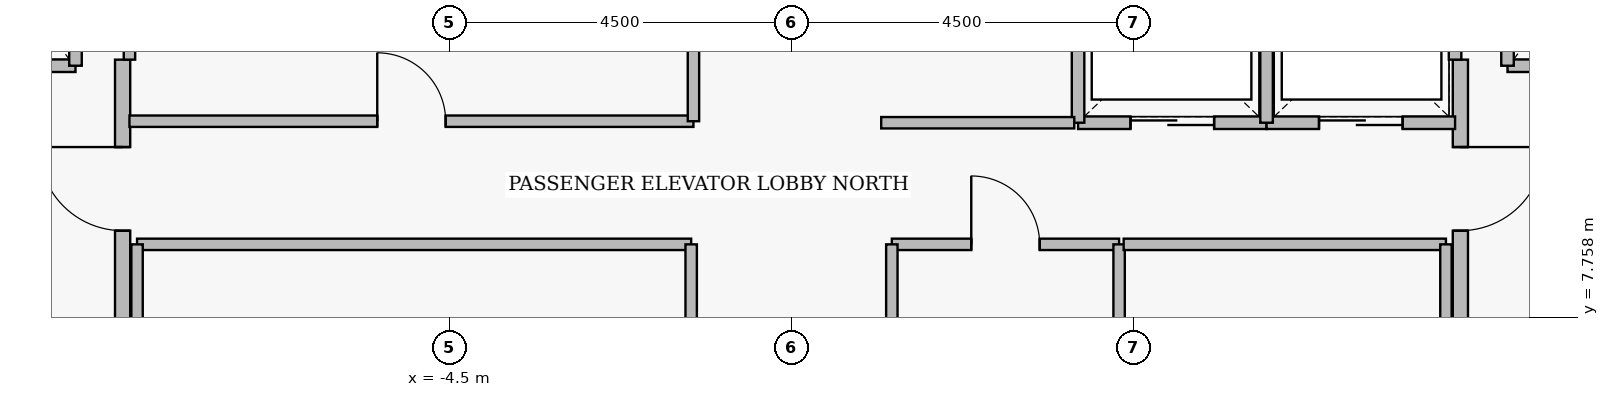
"""IFC4 building model, lengths in metres.
Left out: names, types, materials, properties, quantities, classifications, styles, units other than length and angle.
Written with IfcOpenShell. Run it as: python <this file> out.ifc"""

import sys

from ifc_helpers import new_model, si_unit, direction, frame, frame_2d, origin, place, context, subcontext, project, spatial, rectangle, extrude, element, fill, save


model = new_model("IFC4")
c1 = context("Model", 3, precision=1e-05, world=origin(), true_north=direction((0.0, 1.0)))
c2 = subcontext(c1, "Body", "Model", "MODEL_VIEW")
j1 = project(units=[si_unit("LENGTHUNIT", "METRE"), si_unit("PLANEANGLEUNIT", "RADIAN")], contexts=[c1])
p1 = place(None, origin())
s1 = spatial("IfcSite", under=j1, at=p1, CompositionType="ELEMENT")
p2 = place(p1, origin())
s2 = spatial("IfcBuilding", under=s1, at=p2, CompositionType="ELEMENT")
p3 = place(p2, frame((0.0, 0.0, 292.85)))
s3 = spatial("IfcBuildingStorey", under=s2, at=p3, CompositionType="ELEMENT", Elevation=292.85)
p4 = place(p3, frame((-8.8, 5.05, 0.0), z_axis=(0.0, 0.0, 1.0), x_axis=(0.0, 1.0, 0.0)))
e1 = element("IfcWall", 1, at=p4, inside=s3, PredefinedType="PARTITIONING", context=c2, shape_type="SweptSolid", body=[
    extrude(rectangle(XDim=6.1, YDim=0.2, at=frame_2d((3.05, 0.0))), origin(), (0.0, 0.0, 1.0), 4.16),
])
p5 = place(p4, frame((0.25, 0.0, 0.0)))
e2 = element("IfcOpeningElement", 2, at=p5, cuts=e1, PredefinedType="OPENING", context=c2, shape_type="SweptSolid", body=[
    extrude(rectangle(XDim=1.1, YDim=2.2, at=frame_2d((0.55, 1.1))), frame((0.0, 0.11, 0.0), z_axis=(0.0, -1.0, 0.0), x_axis=(1.0, 0.0, 0.0)), (0.0, 0.0, 1.0), 0.22),
])
p6 = place(p4, frame((3.85, 0.0, 0.0)))
e3 = element("IfcOpeningElement", 3, at=p6, cuts=e1, PredefinedType="OPENING", context=c2, shape_type="SweptSolid", body=[
    extrude(rectangle(XDim=1.1, YDim=2.2, at=frame_2d((0.55, 1.1))), frame((0.0, 0.11, 0.0), z_axis=(0.0, -1.0, 0.0), x_axis=(1.0, 0.0, 0.0)), (0.0, 0.0, 1.0), 0.22),
])
p7 = place(p3, frame((8.8, 11.15, 0.0), z_axis=(0.0, 0.0, 1.0), x_axis=(0.0, -1.0, 0.0)))
e4 = element("IfcWall", 4, at=p7, inside=s3, PredefinedType="PARTITIONING", context=c2, shape_type="SweptSolid", body=[
    extrude(rectangle(XDim=6.1, YDim=0.2, at=frame_2d((3.05, 0.0))), origin(), (0.0, 0.0, 1.0), 4.16),
])
p8 = place(p7, frame((1.15, 0.0, 0.0)))
e5 = element("IfcOpeningElement", 5, at=p8, cuts=e4, PredefinedType="OPENING", context=c2, shape_type="SweptSolid", body=[
    extrude(rectangle(XDim=1.1, YDim=2.2, at=frame_2d((0.55, 1.1))), frame((0.0, 0.11, 0.0), z_axis=(0.0, -1.0, 0.0), x_axis=(1.0, 0.0, 0.0)), (0.0, 0.0, 1.0), 0.22),
])
p9 = place(p7, frame((4.75, 0.0, 0.0)))
e6 = element("IfcOpeningElement", 6, at=p9, cuts=e4, PredefinedType="OPENING", context=c2, shape_type="SweptSolid", body=[
    extrude(rectangle(XDim=1.1, YDim=2.2, at=frame_2d((0.55, 1.1))), frame((0.0, 0.11, 0.0), z_axis=(0.0, -1.0, 0.0), x_axis=(1.0, 0.0, 0.0)), (0.0, 0.0, 1.0), 0.22),
])
p10 = place(p3, frame((-11.58, 11.07, 0.0), z_axis=(0.0, 0.0, 1.0), x_axis=(1.0, 0.0, 0.0)))
e7 = element("IfcWall", 7, at=p10, inside=s3, PredefinedType="PARTITIONING", context=c2, shape_type="SweptSolid", body=[
    extrude(rectangle(XDim=2.16, YDim=0.165, at=frame_2d((1.08, 0.0))), origin(), (0.0, 0.0, 1.0), 4.16),
])
p11 = place(p10, frame((0.53, 0.0, 0.0)))
e8 = element("IfcOpeningElement", 8, at=p11, cuts=e7, PredefinedType="OPENING", context=c2, shape_type="SweptSolid", body=[
    extrude(rectangle(XDim=1.15, YDim=2.25, at=frame_2d((0.575, 1.125))), frame((0.0, 0.093, 0.0), z_axis=(0.0, -1.0, 0.0), x_axis=(1.0, 0.0, 0.0)), (0.0, 0.0, 1.0), 0.185),
])
p12 = place(p3, frame((9.42, 11.07, 0.0), z_axis=(0.0, 0.0, 1.0), x_axis=(1.0, 0.0, 0.0)))
e9 = element("IfcWall", 9, at=p12, inside=s3, PredefinedType="PARTITIONING", context=c2, shape_type="SweptSolid", body=[
    extrude(rectangle(XDim=2.16, YDim=0.165, at=frame_2d((1.08, 0.0))), origin(), (0.0, 0.0, 1.0), 4.16),
])
p13 = place(p12, frame((0.53, 0.0, 0.0)))
e10 = element("IfcOpeningElement", 10, at=p13, cuts=e9, PredefinedType="OPENING", context=c2, shape_type="SweptSolid", body=[
    extrude(rectangle(XDim=1.15, YDim=2.25, at=frame_2d((0.575, 1.125))), frame((0.0, 0.093, 0.0), z_axis=(0.0, -1.0, 0.0), x_axis=(1.0, 0.0, 0.0)), (0.0, 0.0, 1.0), 0.185),
])
p14 = place(p3, frame((3.77, 10.32, 0.0), z_axis=(0.0, 0.0, 1.0), x_axis=(1.0, 0.0, 0.0)))
e11 = element("IfcWall", 11, at=p14, inside=s3, PredefinedType="PARTITIONING", context=c2, shape_type="SweptSolid", body=[
    extrude(rectangle(XDim=2.48, YDim=0.165, at=frame_2d((1.24, 0.0))), origin(), (0.0, 0.0, 1.0), 4.16),
])
p15 = place(p14, frame((0.69, 0.0, 0.0)))
e12 = element("IfcOpeningElement", 12, at=p15, cuts=e11, PredefinedType="OPENING", context=c2, shape_type="SweptSolid", body=[
    extrude(rectangle(XDim=1.1, YDim=2.25, at=frame_2d((0.55, 1.125))), frame((0.0, 0.093, 0.0), z_axis=(0.0, -1.0, 0.0), x_axis=(1.0, 0.0, 0.0)), (0.0, 0.0, 1.0), 0.185),
])
p16 = place(p3, frame((6.25, 10.32, 0.0), z_axis=(0.0, 0.0, 1.0), x_axis=(1.0, 0.0, 0.0)))
e13 = element("IfcWall", 13, at=p16, inside=s3, PredefinedType="PARTITIONING", context=c2, shape_type="SweptSolid", body=[
    extrude(rectangle(XDim=2.48, YDim=0.165, at=frame_2d((1.24, 0.0))), origin(), (0.0, 0.0, 1.0), 4.16),
])
p17 = place(p16, frame((0.69, 0.0, 0.0)))
e14 = element("IfcOpeningElement", 14, at=p17, cuts=e13, PredefinedType="OPENING", context=c2, shape_type="SweptSolid", body=[
    extrude(rectangle(XDim=1.1, YDim=2.25, at=frame_2d((0.55, 1.125))), frame((0.0, 0.093, 0.0), z_axis=(0.0, -1.0, 0.0), x_axis=(1.0, 0.0, 0.0)), (0.0, 0.0, 1.0), 0.185),
])
p18 = place(p3, frame((-8.71, 10.34, 0.0), z_axis=(0.0, 0.0, 1.0), x_axis=(1.0, 0.0, 0.0)))
e15 = element("IfcWall", 15, at=p18, inside=s3, PredefinedType="PARTITIONING", context=c2, shape_type="SweptSolid", body=[
    extrude(rectangle(XDim=7.42, YDim=0.15, at=frame_2d((3.71, 0.0))), origin(), (0.0, 0.0, 1.0), 4.16),
])
p19 = place(p18, frame((3.26, 0.0, 0.0)))
e16 = element("IfcOpeningElement", 16, at=p19, cuts=e15, PredefinedType="OPENING", context=c2, shape_type="SweptSolid", body=[
    extrude(rectangle(XDim=0.9, YDim=2.15, at=frame_2d((0.45, 1.075))), frame((0.0, 0.085, 0.0), z_axis=(0.0, -1.0, 0.0), x_axis=(1.0, 0.0, 0.0)), (0.0, 0.0, 1.0), 0.17),
])
p20 = place(p3, frame((1.32, 8.72, 0.0), z_axis=(0.0, 0.0, 1.0), x_axis=(1.0, 0.0, 0.0)))
e17 = element("IfcWall", 17, at=p20, inside=s3, PredefinedType="PARTITIONING", context=c2, shape_type="SweptSolid", body=[
    extrude(rectangle(XDim=2.99, YDim=0.15, at=frame_2d((1.495, 0.0))), origin(), (0.0, 0.0, 1.0), 4.16),
])
p21 = place(p20, frame((1.045, 0.0, 0.0)))
e18 = element("IfcOpeningElement", 18, at=p21, cuts=e17, PredefinedType="OPENING", context=c2, shape_type="SweptSolid", body=[
    extrude(rectangle(XDim=0.9, YDim=2.15, at=frame_2d((0.45, 1.075))), frame((0.0, 0.085, 0.0), z_axis=(0.0, -1.0, 0.0), x_axis=(1.0, 0.0, 0.0)), (0.0, 0.0, 1.0), 0.17),
])
for number, where, z_axis, x_axis in (
    (19, (-9.42, 11.07, 0.0), (0.0, 0.0, 1.0), (0.0, 1.0, 0.0)),
    (20, (9.42, 11.07, 0.0), (0.0, 0.0, 1.0), (0.0, 1.0, 0.0)),
):
    element("IfcWall", number, at=place(p3, frame(where, z_axis=z_axis, x_axis=x_axis)), inside=s3, PredefinedType="PARTITIONING", context=c2, shape_type="SweptSolid", body=[
        extrude(rectangle(XDim=2.96, YDim=0.165, at=frame_2d((1.48, 0.0))), origin(), (0.0, 0.0, 1.0), 4.16),
    ])
for number, where, z_axis, x_axis in (
    (21, (3.77, 10.32, 0.0), (0.0, 0.0, 1.0), (0.0, 1.0, 0.0)),
    (22, (6.25, 10.32, 0.0), (0.0, 0.0, 1.0), (0.0, 1.0, 0.0)),
):
    element("IfcWall", number, at=place(p3, frame(where, z_axis=z_axis, x_axis=x_axis)), inside=s3, PredefinedType="PARTITIONING", context=c2, shape_type="SweptSolid", body=[
        extrude(rectangle(XDim=2.36, YDim=0.165, at=frame_2d((1.18, 0.0))), origin(), (0.0, 0.0, 1.0), 4.16),
    ])
p22 = place(p3, frame((8.73, 11.15, 0.0), z_axis=(0.0, 0.0, 1.0), x_axis=(0.0, 1.0, 0.0)))
e23 = element("IfcWall", 23, at=p22, inside=s3, PredefinedType="PARTITIONING", context=c2, shape_type="SweptSolid", body=[
    extrude(rectangle(XDim=1.53, YDim=0.165, at=frame_2d((0.765, 0.0))), origin(), (0.0, 0.0, 1.0), 4.16),
])
p23 = place(p3, frame((-8.71, 11.15, 0.0), z_axis=(0.0, 0.0, 1.0), x_axis=(0.0, 1.0, 0.0)))
e24 = element("IfcWall", 24, at=p23, inside=s3, PredefinedType="PARTITIONING", context=c2, shape_type="SweptSolid", body=[
    extrude(rectangle(XDim=1.71, YDim=0.15, at=frame_2d((0.855, 0.0))), origin(), (0.0, 0.0, 1.0), 4.16),
])
p24 = place(p3, frame((-1.29, 10.34, 0.0), z_axis=(0.0, 0.0, 1.0), x_axis=(0.0, 1.0, 0.0)))
e25 = element("IfcWall", 25, at=p24, inside=s3, PredefinedType="PARTITIONING", context=c2, shape_type="SweptSolid", body=[
    extrude(rectangle(XDim=2.52, YDim=0.15, at=frame_2d((1.26, 0.0))), origin(), (0.0, 0.0, 1.0), 4.16),
])
p25 = place(p3, frame((-8.61, 8.72, 0.0), z_axis=(0.0, 0.0, 1.0), x_axis=(1.0, 0.0, 0.0)))
e26 = element("IfcWall", 26, at=p25, inside=s3, PredefinedType="PARTITIONING", context=c2, shape_type="SweptSolid", body=[
    extrude(rectangle(XDim=7.29, YDim=0.15, at=frame_2d((3.645, 0.0))), origin(), (0.0, 0.0, 1.0), 4.16),
])
for number, where, z_axis, x_axis in (
    (27, (-8.61, 6.48, 0.0), (0.0, 0.0, 1.0), (0.0, 1.0, 0.0)),
    (28, (-1.32, 6.48, 0.0), (0.0, 0.0, 1.0), (0.0, 1.0, 0.0)),
    (29, (1.32, 6.48, 0.0), (0.0, 0.0, 1.0), (0.0, 1.0, 0.0)),
    (30, (4.31, 6.48, 0.0), (0.0, 0.0, 1.0), (0.0, 1.0, 0.0)),
):
    element("IfcWall", number, at=place(p3, frame(where, z_axis=z_axis, x_axis=x_axis)), inside=s3, PredefinedType="PARTITIONING", context=c2, shape_type="SweptSolid", body=[
        extrude(rectangle(XDim=2.24, YDim=0.15, at=frame_2d((1.12, 0.0))), origin(), (0.0, 0.0, 1.0), 4.16),
    ])
p26 = place(p3, frame((4.37, 8.72, 0.0), z_axis=(0.0, 0.0, 1.0), x_axis=(1.0, 0.0, 0.0)))
e31 = element("IfcWall", 31, at=p26, inside=s3, PredefinedType="PARTITIONING", context=c2, shape_type="SweptSolid", body=[
    extrude(rectangle(XDim=4.24, YDim=0.15, at=frame_2d((2.12, 0.0))), origin(), (0.0, 0.0, 1.0), 4.16),
])
p27 = place(p3, frame((8.61, 6.48, 0.0), z_axis=(0.0, 0.0, 1.0), x_axis=(0.0, 1.0, 0.0)))
e32 = element("IfcWall", 32, at=p27, inside=s3, PredefinedType="PARTITIONING", context=c2, shape_type="SweptSolid", body=[
    extrude(rectangle(XDim=2.24, YDim=0.15, at=frame_2d((1.12, 0.0))), origin(), (0.0, 0.0, 1.0), 4.16),
])
p28 = place(p3, frame((1.18, 10.32, 0.0), z_axis=(0.0, 0.0, 1.0), x_axis=(1.0, 0.0, 0.0)))
e33 = element("IfcWall", 33, at=p28, inside=s3, PredefinedType="PARTITIONING", context=c2, shape_type="SweptSolid", body=[
    extrude(rectangle(XDim=2.54, YDim=0.15, at=frame_2d((1.27, 0.0))), origin(), (0.0, 0.0, 1.0), 4.16),
])
p29 = place(p6, origin())
e34 = element("IfcDoor", 34, at=p29, inside=s3, OperationType="SINGLE_SWING_RIGHT", PredefinedType="DOOR", context=c2, shape_type="SweptSolid", body=[
    extrude(rectangle(XDim=1.1, YDim=2.2, at=frame_2d((0.55, 1.1))), frame((0.0, 0.025, 0.0), z_axis=(0.0, -1.0, 0.0), x_axis=(1.0, 0.0, 0.0)), (0.0, 0.0, 1.0), 0.05),
])
fill(e3, e34)
p30 = place(p8, origin())
e35 = element("IfcDoor", 35, at=p30, inside=s3, OperationType="SINGLE_SWING_LEFT", PredefinedType="DOOR", context=c2, shape_type="SweptSolid", body=[
    extrude(rectangle(XDim=1.1, YDim=2.2, at=frame_2d((0.55, 1.1))), frame((0.0, 0.025, 0.0), z_axis=(0.0, -1.0, 0.0), x_axis=(1.0, 0.0, 0.0)), (0.0, 0.0, 1.0), 0.05),
])
fill(e5, e35)
p31 = place(p15, origin())
e36 = element("IfcDoor", 36, at=p31, inside=s3, OperationType="SLIDING_TO_LEFT", PredefinedType="DOOR", context=c2, shape_type="SweptSolid", body=[
    extrude(rectangle(XDim=1.1, YDim=2.25, at=frame_2d((0.55, 1.125))), frame((0.0, 0.025, 0.0), z_axis=(0.0, -1.0, 0.0), x_axis=(1.0, 0.0, 0.0)), (0.0, 0.0, 1.0), 0.05),
])
fill(e12, e36)
p32 = place(p17, origin())
e37 = element("IfcDoor", 37, at=p32, inside=s3, OperationType="SLIDING_TO_LEFT", PredefinedType="DOOR", context=c2, shape_type="SweptSolid", body=[
    extrude(rectangle(XDim=1.1, YDim=2.25, at=frame_2d((0.55, 1.125))), frame((0.0, 0.025, 0.0), z_axis=(0.0, -1.0, 0.0), x_axis=(1.0, 0.0, 0.0)), (0.0, 0.0, 1.0), 0.05),
])
fill(e14, e37)
p33 = place(p19, origin())
e38 = element("IfcDoor", 38, at=p33, inside=s3, OperationType="SINGLE_SWING_LEFT", PredefinedType="DOOR", context=c2, shape_type="SweptSolid", body=[
    extrude(rectangle(XDim=0.9, YDim=2.15, at=frame_2d((0.45, 1.075))), frame((0.0, 0.025, 0.0), z_axis=(0.0, -1.0, 0.0), x_axis=(1.0, 0.0, 0.0)), (0.0, 0.0, 1.0), 0.05),
])
fill(e16, e38)
p34 = place(p21, origin())
e39 = element("IfcDoor", 39, at=p34, inside=s3, OperationType="SINGLE_SWING_LEFT", PredefinedType="DOOR", context=c2, shape_type="SweptSolid", body=[
    extrude(rectangle(XDim=0.9, YDim=2.15, at=frame_2d((0.45, 1.075))), frame((0.0, 0.025, 0.0), z_axis=(0.0, -1.0, 0.0), x_axis=(1.0, 0.0, 0.0)), (0.0, 0.0, 1.0), 0.05),
])
fill(e18, e39)
save(model, sys.argv[1])
